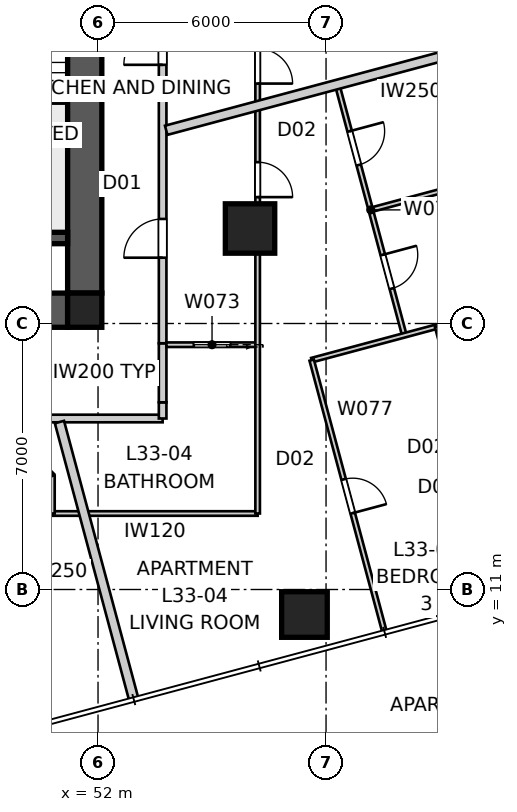
"""IFC4 building model, lengths in metres.
Left out: names, types, materials, properties, quantities, classifications, styles, units other than length and angle.
Written with IfcOpenShell. Run it as: python <this file> out.ifc"""

import sys

from ifc_helpers import new_model, si_unit, direction, frame, frame_2d, origin, origin_2d, place, context, subcontext, project, spatial, polyline, rectangle, outline, extrude, element, fill, save


model = new_model("IFC4")
c1 = context("Model", 3, precision=1e-05, world=origin(), true_north=direction((0.0, 1.0)))
c2 = subcontext(c1, "Body", "Model", "MODEL_VIEW")
j1 = project(units=[si_unit("LENGTHUNIT", "METRE"), si_unit("PLANEANGLEUNIT", "RADIAN")], contexts=[c1])
p1 = place(None, origin())
s1 = spatial("IfcSite", under=j1, at=p1, CompositionType="ELEMENT")
p2 = place(p1, origin())
s2 = spatial("IfcBuilding", under=s1, at=p2, CompositionType="ELEMENT")
p3 = place(p2, frame((0.0, 0.0, 121.8)))
s3 = spatial("IfcBuildingStorey", under=s2, at=p3, CompositionType="ELEMENT", Elevation=121.8)
p4 = place(p3, frame((51.2, 18.35, 0.0), z_axis=(0.0, 0.0, 1.0), x_axis=(-1.0, 0.0, 0.0)))
e1 = element("IfcWall", 1, at=p4, inside=s3, PredefinedType="SHEAR", context=c2, shape_type="SweptSolid", body=[
    extrude(outline(polyline([(0.0, -0.45), (22.4, -0.45), (22.4, -0.025), (22.85, -0.025), (22.85, 0.025), (22.4, 0.025), (22.4, 0.45), (0.0, 0.45), (0.0, 0.025), (-0.45, 0.025), (-0.45, -0.025), (0.0, -0.025), (0.0, -0.45)])), origin(), (0.0, 0.0, 1.0), 3.4),
])
p5 = place(p3, frame((51.65, 18.8, 0.0), z_axis=(0.0, 0.0, 1.0), x_axis=(0.0, 1.0, 0.0)))
e2 = element("IfcWall", 2, at=p5, inside=s3, PredefinedType="SHEAR", context=c2, shape_type="SweptSolid", body=[
    extrude(outline(polyline([(0.0, -0.45), (22.4, -0.45), (22.4, -0.025), (22.85, -0.025), (22.85, 0.025), (22.4, 0.025), (22.4, 0.45), (0.0, 0.45), (0.0, 0.025), (-0.45, 0.025), (-0.45, -0.025), (0.0, -0.025), (0.0, -0.45)])), origin(), (0.0, 0.0, 1.0), 3.4),
])
p6 = place(p5, frame((11.14, 0.0, 0.0)))
e3 = element("IfcOpeningElement", 3, at=p6, cuts=e2, PredefinedType="OPENING", context=c2, shape_type="SweptSolid", body=[
    extrude(rectangle(XDim=1.02, YDim=2.4, at=frame_2d((0.51, 1.2))), frame((0.0, 0.46, 0.0), z_axis=(0.0, -1.0, 0.0), x_axis=(1.0, 0.0, 0.0)), (0.0, 0.0, 1.0), 0.92),
])
p7 = place(p3, frame((51.2, 20.25, 0.0), z_axis=(0.0, 0.0, 1.0), x_axis=(-1.0, 0.0, 0.0)))
e4 = element("IfcWall", 4, at=p7, inside=s3, PredefinedType="SHEAR", context=c2, shape_type="SweptSolid", body=[
    extrude(rectangle(XDim=3.5, YDim=0.3, at=frame_2d((1.75, 0.0))), origin(), (0.0, 0.0, 1.0), 3.4),
])
p8 = place(p3, frame((51.65, 18.35, 0.0), z_axis=(0.0, 0.0, 1.0), x_axis=(1.0, 0.0, 0.0)))
e5 = element("IfcColumn", 5, at=p8, inside=s3, PredefinedType="COLUMN", context=c2, shape_type="SweptSolid", body=[
    extrude(rectangle(XDim=0.9, YDim=0.9, at=origin_2d()), origin(), (0.0, 0.0, 1.0), 3.4),
])
p9 = place(p3, frame((57.432, 10.342, 0.0), z_axis=(0.0, 0.0, 1.0), x_axis=(1.0, 0.0, 0.0)))
e6 = element("IfcColumn", 6, at=p9, inside=s3, PredefinedType="COLUMN", context=c2, shape_type="SweptSolid", body=[
    extrude(rectangle(XDim=1.2, YDim=1.2, at=origin_2d()), origin(), (0.0, 0.0, 1.0), 3.4),
])
p10 = place(p3, frame((56.0, 20.5, 0.0), z_axis=(0.0, 0.0, 1.0), x_axis=(1.0, 0.0, 0.0)))
e7 = element("IfcColumn", 7, at=p10, inside=s3, PredefinedType="COLUMN", context=c2, shape_type="SweptSolid", body=[
    extrude(rectangle(XDim=1.3, YDim=1.3, at=origin_2d()), origin(), (0.0, 0.0, 1.0), 3.4),
])
p11 = place(p3, frame((25.5, 15.5, 0.0), z_axis=(0.0, 0.0, 1.0), x_axis=(1.0, 0.0, 0.0)))
e8 = element("IfcWall", 8, at=p11, inside=s3, PredefinedType="PARTITIONING", context=c2, shape_type="SweptSolid", body=[
    extrude(rectangle(XDim=28.2, YDim=0.2, at=frame_2d((14.1, 0.0))), origin(), (0.0, 0.0, 1.0), 3.25),
])
p12 = place(p11, frame((2.244, 0.0, 0.0)))
e9 = element("IfcOpeningElement", 9, at=p12, cuts=e8, PredefinedType="OPENING", context=c2, shape_type="SweptSolid", body=[
    extrude(rectangle(XDim=1.02, YDim=2.1, at=frame_2d((0.51, 1.05))), frame((0.0, 0.11, 0.0), z_axis=(0.0, -1.0, 0.0), x_axis=(1.0, 0.0, 0.0)), (0.0, 0.0, 1.0), 0.22),
])
p13 = place(p11, frame((9.542, 0.0, 0.0)))
e10 = element("IfcOpeningElement", 10, at=p13, cuts=e8, PredefinedType="OPENING", context=c2, shape_type="SweptSolid", body=[
    extrude(rectangle(XDim=1.02, YDim=2.34, at=frame_2d((0.51, 1.17))), frame((0.0, 0.11, 0.0), z_axis=(0.0, -1.0, 0.0), x_axis=(1.0, 0.0, 0.0)), (0.0, 0.0, 1.0), 0.22),
])
p14 = place(p11, frame((21.994, 0.0, 0.0)))
e11 = element("IfcOpeningElement", 11, at=p14, cuts=e8, PredefinedType="OPENING", context=c2, shape_type="SweptSolid", body=[
    extrude(rectangle(XDim=1.02, YDim=2.34, at=frame_2d((0.51, 1.17))), frame((0.0, 0.11, 0.0), z_axis=(0.0, -1.0, 0.0), x_axis=(1.0, 0.0, 0.0)), (0.0, 0.0, 1.0), 0.22),
])
p15 = place(p3, frame((53.7, 15.5, 0.0), z_axis=(0.0, 0.0, 1.0), x_axis=(0.0, 1.0, 0.0)))
e12 = element("IfcWall", 12, at=p15, inside=s3, PredefinedType="PARTITIONING", context=c2, shape_type="SweptSolid", body=[
    extrude(rectangle(XDim=0.426, YDim=0.2, at=frame_2d((0.213, 0.0))), origin(), (0.0, 0.0, 1.0), 3.25),
])
p16 = place(p3, frame((53.7, 15.926, 0.0), z_axis=(0.0, 0.0, 1.0), x_axis=(0.0, 1.0, 0.0)))
e13 = element("IfcWall", 13, at=p16, inside=s3, PredefinedType="PARTITIONING", context=c2, shape_type="SweptSolid", body=[
    extrude(rectangle(XDim=1.554, YDim=0.2, at=frame_2d((0.777, 0.0))), origin(), (0.0, 0.0, 1.0), 2.722),
])
p17 = place(p3, frame((53.7, 17.48, 0.0), z_axis=(0.0, 0.0, 1.0), x_axis=(0.0, 1.0, 0.0)))
e14 = element("IfcWall", 14, at=p17, inside=s3, PredefinedType="PARTITIONING", context=c2, shape_type="SweptSolid", body=[
    extrude(rectangle(XDim=26.22, YDim=0.2, at=frame_2d((13.11, 0.0))), origin(), (0.0, 0.0, 1.0), 3.25),
])
p18 = place(p17, frame((2.252, 0.0, 0.0)))
e15 = element("IfcOpeningElement", 15, at=p18, cuts=e14, PredefinedType="OPENING", context=c2, shape_type="SweptSolid", body=[
    extrude(rectangle(XDim=1.02, YDim=2.34, at=frame_2d((0.51, 1.17))), frame((0.0, 0.11, 0.0), z_axis=(0.0, -1.0, 0.0), x_axis=(1.0, 0.0, 0.0)), (0.0, 0.0, 1.0), 0.22),
])
p19 = place(p17, frame((7.328, 0.0, 0.0)))
e16 = element("IfcOpeningElement", 16, at=p19, cuts=e14, PredefinedType="OPENING", context=c2, shape_type="SweptSolid", body=[
    extrude(rectangle(XDim=1.02, YDim=2.34, at=frame_2d((0.51, 1.17))), frame((0.0, 0.11, 0.0), z_axis=(0.0, -1.0, 0.0), x_axis=(1.0, 0.0, 0.0)), (0.0, 0.0, 1.0), 0.22),
])
p20 = place(p3, frame((52.942, 8.104, 0.0), z_axis=(0.0, 0.0, 1.0), x_axis=(-0.258822171171, 0.965924988656, 0.0)))
e17 = element("IfcWall", 17, at=p20, inside=s3, PredefinedType="PARTITIONING", context=c2, shape_type="SweptSolid", body=[
    extrude(rectangle(XDim=7.56, YDim=0.25, at=frame_2d((3.78, 0.0))), origin(), (0.0, 0.0, 1.0), 3.25),
])
p21 = place(p3, frame((66.318, 26.44, 0.0), z_axis=(0.0, 0.0, 1.0), x_axis=(-0.965924854576, -0.258822671559, 0.0)))
e18 = element("IfcWall", 18, at=p21, inside=s3, PredefinedType="PARTITIONING", context=c2, shape_type="SweptSolid", body=[
    extrude(rectangle(XDim=12.966, YDim=0.25, at=frame_2d((6.483, 0.0))), origin(), (0.0, 0.0, 1.0), 3.25),
])
p22 = place(p3, frame((56.2, 13.0, 0.0), z_axis=(0.0, 0.0, 1.0), x_axis=(-1.0, 0.0, 0.0)))
e19 = element("IfcWall", 19, at=p22, inside=s3, PredefinedType="PARTITIONING", context=c2, shape_type="SweptSolid", body=[
    extrude(rectangle(XDim=5.4, YDim=0.12, at=frame_2d((2.7, 0.0))), origin(), (0.0, 0.0, 1.0), 3.25),
])
p23 = place(p3, frame((50.8, 13.0, 0.0), z_axis=(0.0, 0.0, 1.0), x_axis=(0.0, 1.0, 0.0)))
e20 = element("IfcWall", 20, at=p23, inside=s3, PredefinedType="PARTITIONING", context=c2, shape_type="SweptSolid", body=[
    extrude(rectangle(XDim=1.0, YDim=0.12, at=frame_2d((0.5, 0.0))), origin(), (0.0, 0.0, 1.0), 3.25),
])
p24 = place(p3, frame((50.8, 14.0, 0.0), z_axis=(0.0, 0.0, 1.0), x_axis=(-0.707106781187, 0.707106781187, 0.0)))
e21 = element("IfcWall", 21, at=p24, inside=s3, PredefinedType="PARTITIONING", context=c2, shape_type="SweptSolid", body=[
    extrude(rectangle(XDim=0.849, YDim=0.12, at=frame_2d((0.424, 0.0))), origin(), (0.0, 0.0, 1.0), 3.25),
])
p25 = place(p3, frame((56.2, 17.442, 0.0), z_axis=(0.0, 0.0, 1.0), x_axis=(-1.0, 0.0, 0.0)))
e22 = element("IfcWall", 22, at=p25, inside=s3, PredefinedType="PARTITIONING", context=c2, shape_type="SweptSolid", body=[
    extrude(rectangle(XDim=2.4, YDim=0.12, at=frame_2d((1.2, 0.0))), origin(), (0.0, 0.0, 1.0), 3.25),
])
p26 = place(p25, frame((0.72, 0.0, 0.0)))
e23 = element("IfcOpeningElement", 23, at=p26, cuts=e22, PredefinedType="OPENING", context=c2, shape_type="SweptSolid", body=[
    extrude(rectangle(XDim=0.96, YDim=2.1, at=frame_2d((0.48, 1.05))), frame((0.0, 0.07, 0.0), z_axis=(0.0, -1.0, 0.0), x_axis=(1.0, 0.0, 0.0)), (0.0, 0.0, 1.0), 0.14),
])
p27 = place(p3, frame((56.2, 46.2, 0.0), z_axis=(0.0, 0.0, 1.0), x_axis=(0.0, -1.0, 0.0)))
e24 = element("IfcWall", 24, at=p27, inside=s3, PredefinedType="PARTITIONING", context=c2, shape_type="SweptSolid", body=[
    extrude(rectangle(XDim=33.2, YDim=0.12, at=frame_2d((16.6, 0.0))), origin(), (0.0, 0.0, 1.0), 2.55),
])
p28 = place(p27, frame((23.955, 0.0, 0.0)))
e25 = element("IfcOpeningElement", 25, at=p28, cuts=e24, PredefinedType="OPENING", context=c2, shape_type="SweptSolid", body=[
    extrude(rectangle(XDim=0.92, YDim=2.34, at=frame_2d((0.46, 1.17))), frame((0.0, 0.07, 0.0), z_axis=(0.0, -1.0, 0.0), x_axis=(1.0, 0.0, 0.0)), (0.0, 0.0, 1.0), 0.14),
])
p29 = place(p27, frame((20.966, 0.0, 0.0)))
e26 = element("IfcOpeningElement", 26, at=p29, cuts=e24, PredefinedType="OPENING", context=c2, shape_type="SweptSolid", body=[
    extrude(rectangle(XDim=0.92, YDim=2.34, at=frame_2d((0.46, 1.17))), frame((0.0, 0.07, 0.0), z_axis=(0.0, -1.0, 0.0), x_axis=(1.0, 0.0, 0.0)), (0.0, 0.0, 1.0), 0.14),
])
p30 = place(p27, frame((13.174, 0.0, 0.0)))
e27 = element("IfcOpeningElement", 27, at=p30, cuts=e24, PredefinedType="OPENING", context=c2, shape_type="SweptSolid", body=[
    extrude(rectangle(XDim=0.96, YDim=2.1, at=frame_2d((0.48, 1.05))), frame((0.0, 0.07, 0.0), z_axis=(0.0, -1.0, 0.0), x_axis=(1.0, 0.0, 0.0)), (0.0, 0.0, 1.0), 0.14),
])
p31 = place(p3, frame((58.292, 24.29, 0.0), z_axis=(0.0, 0.0, 1.0), x_axis=(0.258809899302, -0.965928276853, 0.0)))
e28 = element("IfcWall", 28, at=p31, inside=s3, PredefinedType="PARTITIONING", context=c2, shape_type="SweptSolid", body=[
    extrude(rectangle(XDim=6.833, YDim=0.12, at=frame_2d((3.417, 0.0))), origin(), (0.0, 0.0, 1.0), 3.25),
])
p32 = place(p31, frame((1.273, 0.0, 0.0)))
e29 = element("IfcOpeningElement", 29, at=p32, cuts=e28, PredefinedType="OPENING", context=c2, shape_type="SweptSolid", body=[
    extrude(rectangle(XDim=0.92, YDim=2.34, at=frame_2d((0.46, 1.17))), frame((0.0, 0.07, 0.0), z_axis=(0.0, -1.0, 0.0), x_axis=(1.0, 0.0, 0.0)), (0.0, 0.0, 1.0), 0.14),
])
p33 = place(p31, frame((4.64, 0.0, 0.0)))
e30 = element("IfcOpeningElement", 30, at=p33, cuts=e28, PredefinedType="OPENING", context=c2, shape_type="SweptSolid", body=[
    extrude(rectangle(XDim=0.92, YDim=2.34, at=frame_2d((0.46, 1.17))), frame((0.0, 0.07, 0.0), z_axis=(0.0, -1.0, 0.0), x_axis=(1.0, 0.0, 0.0)), (0.0, 0.0, 1.0), 0.14),
])
p34 = place(p3, frame((68.048, 19.83, 0.0), z_axis=(0.0, 0.0, 1.0), x_axis=(-0.965921496576, -0.258835203272, 0.0)))
e31 = element("IfcWall", 31, at=p34, inside=s3, PredefinedType="PARTITIONING", context=c2, shape_type="SweptSolid", body=[
    extrude(rectangle(XDim=10.793, YDim=0.12, at=frame_2d((5.397, 0.0))), origin(), (0.0, 0.0, 1.0), 3.25),
])
p35 = place(p3, frame((57.623, 17.036, 0.0), z_axis=(0.0, 0.0, 1.0), x_axis=(0.258816044185, -0.965926630377, 0.0)))
e32 = element("IfcWall", 32, at=p35, inside=s3, PredefinedType="PARTITIONING", context=c2, shape_type="SweptSolid", body=[
    extrude(rectangle(XDim=7.377, YDim=0.12, at=frame_2d((3.688, 0.0))), origin(), (0.0, 0.0, 1.0), 2.638),
])
p36 = place(p35, frame((3.248, 0.0, 0.0)))
e33 = element("IfcOpeningElement", 33, at=p36, cuts=e32, PredefinedType="OPENING", context=c2, shape_type="SweptSolid", body=[
    extrude(rectangle(XDim=0.92, YDim=2.34, at=frame_2d((0.46, 1.17))), frame((0.0, 0.07, 0.0), z_axis=(0.0, -1.0, 0.0), x_axis=(1.0, 0.0, 0.0)), (0.0, 0.0, 1.0), 0.14),
])
p37 = place(p3, frame((67.164, 23.13, 0.0), z_axis=(0.0, 0.0, 1.0), x_axis=(-0.965929470378, -0.258805444794, 0.0)))
e34 = element("IfcWall", 34, at=p37, inside=s3, PredefinedType="PARTITIONING", context=c2, shape_type="SweptSolid", body=[
    extrude(rectangle(XDim=8.269, YDim=0.12, at=frame_2d((4.135, 0.0))), origin(), (0.0, 0.0, 1.0), 2.722),
])
p38 = place(p3, frame((60.923, 17.92, 0.0), z_axis=(0.0, 0.0, 1.0), x_axis=(0.258846923464, -0.965918355874, 0.0)))
e35 = element("IfcWall", 35, at=p38, inside=s3, PredefinedType="PARTITIONING", context=c2, shape_type="SweptSolid", body=[
    extrude(rectangle(XDim=7.377, YDim=0.12, at=frame_2d((3.688, 0.0))), origin(), (0.0, 0.0, 1.0), 3.25),
])
p39 = place(p38, frame((4.932, 0.0, 0.0)))
e36 = element("IfcOpeningElement", 36, at=p39, cuts=e35, PredefinedType="OPENING", context=c2, shape_type="SweptSolid", body=[
    extrude(rectangle(XDim=0.92, YDim=2.34, at=frame_2d((0.46, 1.17))), frame((0.0, 0.07, 0.0), z_axis=(0.0, -1.0, 0.0), x_axis=(1.0, 0.0, 0.0)), (0.0, 0.0, 1.0), 0.14),
])
p40 = place(p38, frame((1.273, 0.0, 0.0)))
e37 = element("IfcOpeningElement", 37, at=p40, cuts=e35, PredefinedType="OPENING", context=c2, shape_type="SweptSolid", body=[
    extrude(rectangle(XDim=0.92, YDim=2.34, at=frame_2d((0.46, 1.17))), frame((0.0, 0.07, 0.0), z_axis=(0.0, -1.0, 0.0), x_axis=(1.0, 0.0, 0.0)), (0.0, 0.0, 1.0), 0.14),
])
p41 = place(p18, origin())
e38 = element("IfcDoor", 38, at=p41, inside=s3, OperationType="SINGLE_SWING_LEFT", PredefinedType="DOOR", context=c2, shape_type="SweptSolid", body=[
    extrude(rectangle(XDim=1.02, YDim=2.34, at=frame_2d((0.51, 1.17))), frame((0.0, 0.025, 0.0), z_axis=(0.0, -1.0, 0.0), x_axis=(1.0, 0.0, 0.0)), (0.0, 0.0, 1.0), 0.05),
])
fill(e15, e38)
p42 = place(p19, origin())
e39 = element("IfcDoor", 39, at=p42, inside=s3, OperationType="SINGLE_SWING_LEFT", PredefinedType="DOOR", context=c2, shape_type="SweptSolid", body=[
    extrude(rectangle(XDim=1.02, YDim=2.34, at=frame_2d((0.51, 1.17))), frame((0.0, 0.025, 0.0), z_axis=(0.0, -1.0, 0.0), x_axis=(1.0, 0.0, 0.0)), (0.0, 0.0, 1.0), 0.05),
])
fill(e16, e39)
p43 = place(p28, origin())
e40 = element("IfcDoor", 40, at=p43, inside=s3, OperationType="SINGLE_SWING_RIGHT", PredefinedType="DOOR", context=c2, shape_type="SweptSolid", body=[
    extrude(rectangle(XDim=0.92, YDim=2.34, at=frame_2d((0.46, 1.17))), frame((0.0, 0.025, 0.0), z_axis=(0.0, -1.0, 0.0), x_axis=(1.0, 0.0, 0.0)), (0.0, 0.0, 1.0), 0.05),
])
fill(e25, e40)
p44 = place(p26, origin())
e41 = element("IfcDoor", 41, at=p44, inside=s3, OperationType="SLIDING_TO_LEFT", PredefinedType="DOOR", context=c2, shape_type="SweptSolid", body=[
    extrude(rectangle(XDim=0.96, YDim=2.1, at=frame_2d((0.48, 1.05))), frame((0.0, 0.025, 0.0), z_axis=(0.0, -1.0, 0.0), x_axis=(1.0, 0.0, 0.0)), (0.0, 0.0, 1.0), 0.05),
])
fill(e23, e41)
p45 = place(p29, origin())
e42 = element("IfcDoor", 42, at=p45, inside=s3, OperationType="SINGLE_SWING_RIGHT", PredefinedType="DOOR", context=c2, shape_type="SweptSolid", body=[
    extrude(rectangle(XDim=0.92, YDim=2.34, at=frame_2d((0.46, 1.17))), frame((0.0, 0.025, 0.0), z_axis=(0.0, -1.0, 0.0), x_axis=(1.0, 0.0, 0.0)), (0.0, 0.0, 1.0), 0.05),
])
fill(e26, e42)
p46 = place(p36, origin())
e43 = element("IfcDoor", 43, at=p46, inside=s3, OperationType="SINGLE_SWING_RIGHT", PredefinedType="DOOR", context=c2, shape_type="SweptSolid", body=[
    extrude(rectangle(XDim=0.92, YDim=2.34, at=frame_2d((0.46, 1.17))), frame((0.0, 0.025, 0.0), z_axis=(0.0, -1.0, 0.0), x_axis=(1.0, 0.0, 0.0)), (0.0, 0.0, 1.0), 0.05),
])
fill(e33, e43)
p47 = place(p32, origin())
e44 = element("IfcDoor", 44, at=p47, inside=s3, OperationType="SINGLE_SWING_LEFT", PredefinedType="DOOR", context=c2, shape_type="SweptSolid", body=[
    extrude(rectangle(XDim=0.92, YDim=2.34, at=frame_2d((0.46, 1.17))), frame((0.0, 0.025, 0.0), z_axis=(0.0, -1.0, 0.0), x_axis=(1.0, 0.0, 0.0)), (0.0, 0.0, 1.0), 0.05),
])
fill(e29, e44)
p48 = place(p33, origin())
e45 = element("IfcDoor", 45, at=p48, inside=s3, OperationType="SINGLE_SWING_LEFT", PredefinedType="DOOR", context=c2, shape_type="SweptSolid", body=[
    extrude(rectangle(XDim=0.92, YDim=2.34, at=frame_2d((0.46, 1.17))), frame((0.0, 0.025, 0.0), z_axis=(0.0, -1.0, 0.0), x_axis=(1.0, 0.0, 0.0)), (0.0, 0.0, 1.0), 0.05),
])
fill(e30, e45)
save(model, sys.argv[1])
